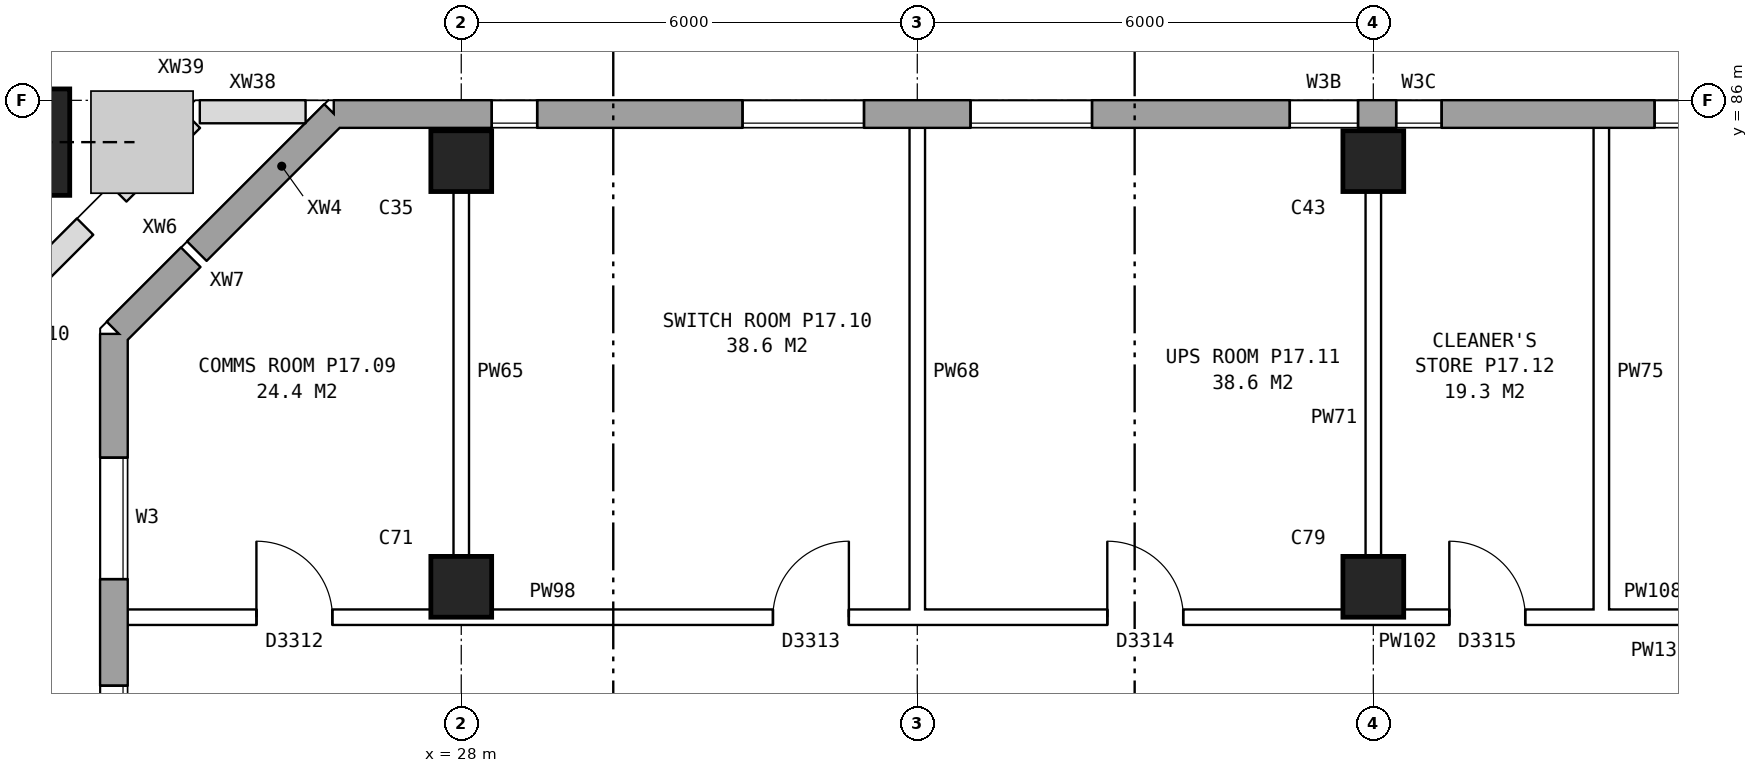
"""IFC4 building model, lengths in metres.
Left out: names, types, materials, properties, quantities, classifications, styles, units other than length and angle.
Written with IfcOpenShell. Run it as: python <this file> out.ifc"""

import sys

from ifc_helpers import new_model, si_unit, direction, frame, frame_2d, origin, origin_2d, place, context, subcontext, project, spatial, rectangle, hollow_rectangle, extrude, element, fill, save


model = new_model("IFC4")
c1 = context("Model", 3, precision=1e-05, world=origin(), true_north=direction((0.0, 1.0)))
c2 = subcontext(c1, "Body", "Model", "MODEL_VIEW")
j1 = project(units=[si_unit("LENGTHUNIT", "METRE"), si_unit("PLANEANGLEUNIT", "RADIAN")], contexts=[c1])
p1 = place(None, origin())
s1 = spatial("IfcSite", under=j1, at=p1, CompositionType="ELEMENT")
p2 = place(p1, origin())
s2 = spatial("IfcBuilding", under=s1, at=p2, CompositionType="ELEMENT")
p3 = place(p2, frame((0.0, 0.0, 62.9)))
s3 = spatial("IfcBuildingStorey", under=s2, at=p3, CompositionType="ELEMENT", Elevation=62.9)
for number, where, z_axis, x_axis in (
    (1, (28.0, 79.6, 0.0), (0.0, 0.0, 1.0), (1.0, 0.0, 0.0)),
    (2, (28.0, 85.2, 0.0), (0.0, 0.0, 1.0), (1.0, 0.0, 0.0)),
    (3, (40.0, 79.6, 0.0), (0.0, 0.0, 1.0), (1.0, 0.0, 0.0)),
    (4, (40.0, 85.2, 0.0), (0.0, 0.0, 1.0), (1.0, 0.0, 0.0)),
):
    element("IfcColumn", number, at=place(p3, frame(where, z_axis=z_axis, x_axis=x_axis)), inside=s3, PredefinedType="COLUMN", context=c2, shape_type="SweptSolid", body=[
        extrude(rectangle(XDim=0.8, YDim=0.8, at=origin_2d()), origin(), (0.0, 0.0, 1.0), 4.2),
    ])
p4 = place(p3, frame((22.149, 85.45, 0.254), z_axis=(0.362471013714, 0.0, 0.931995045168), x_axis=(0.0, 1.0, 0.0)))
e5 = element("IfcColumn", 5, at=p4, inside=s3, PredefinedType="COLUMN", context=c2, shape_type="SweptSolid", body=[
    extrude(hollow_rectangle(XDim=1.4, YDim=1.4, WallThickness=0.075, at=origin_2d()), origin(), (0.0, 0.0, 1.0), 4.284),
])
p5 = place(p3, frame((72.925, 85.82, 0.0), z_axis=(0.0, 0.0, 1.0), x_axis=(-1.0, 0.0, 0.0)))
e6 = element("IfcWall", 6, at=p5, inside=s3, PredefinedType="STANDARD", context=c2, shape_type="SweptSolid", body=[
    extrude(rectangle(XDim=46.601, YDim=0.36, at=frame_2d((23.3, 0.0))), origin(), (0.0, 0.0, 1.0), 4.2),
])
p6 = place(p5, frame((1.15, 0.0, 1.5)))
e7 = element("IfcOpeningElement", 7, at=p6, cuts=e6, PredefinedType="OPENING", context=c2, shape_type="SweptSolid", body=[
    extrude(rectangle(XDim=1.2, YDim=1.2, at=frame_2d((0.6, 0.6))), frame((0.0, 0.19, 0.0), z_axis=(0.0, -1.0, 0.0), x_axis=(1.0, 0.0, 0.0)), (0.0, 0.0, 1.0), 0.38),
])
p7 = place(p5, frame((3.625, 0.0, 1.5)))
e8 = element("IfcOpeningElement", 8, at=p7, cuts=e6, PredefinedType="OPENING", context=c2, shape_type="SweptSolid", body=[
    extrude(rectangle(XDim=1.6, YDim=1.2, at=frame_2d((0.8, 0.6))), frame((0.0, 0.19, 0.0), z_axis=(0.0, -1.0, 0.0), x_axis=(1.0, 0.0, 0.0)), (0.0, 0.0, 1.0), 0.38),
])
p8 = place(p5, frame((9.125, 0.0, 1.5)))
e9 = element("IfcOpeningElement", 9, at=p8, cuts=e6, PredefinedType="OPENING", context=c2, shape_type="SweptSolid", body=[
    extrude(rectangle(XDim=1.2, YDim=1.2, at=frame_2d((0.6, 0.6))), frame((0.0, 0.19, 0.0), z_axis=(0.0, -1.0, 0.0), x_axis=(1.0, 0.0, 0.0)), (0.0, 0.0, 1.0), 0.38),
])
p9 = place(p5, frame((12.625, 0.0, 1.5)))
e10 = element("IfcOpeningElement", 10, at=p9, cuts=e6, PredefinedType="OPENING", context=c2, shape_type="SweptSolid", body=[
    extrude(rectangle(XDim=1.6, YDim=1.2, at=frame_2d((0.8, 0.6))), frame((0.0, 0.19, 0.0), z_axis=(0.0, -1.0, 0.0), x_axis=(1.0, 0.0, 0.0)), (0.0, 0.0, 1.0), 0.38),
])
p10 = place(p5, frame((15.625, 0.0, 1.5)))
e11 = element("IfcOpeningElement", 11, at=p10, cuts=e6, PredefinedType="OPENING", context=c2, shape_type="SweptSolid", body=[
    extrude(rectangle(XDim=1.6, YDim=1.2, at=frame_2d((0.8, 0.6))), frame((0.0, 0.19, 0.0), z_axis=(0.0, -1.0, 0.0), x_axis=(1.0, 0.0, 0.0)), (0.0, 0.0, 1.0), 0.38),
])
p11 = place(p5, frame((20.175, 0.0, 1.5)))
e12 = element("IfcOpeningElement", 12, at=p11, cuts=e6, PredefinedType="OPENING", context=c2, shape_type="SweptSolid", body=[
    extrude(rectangle(XDim=1.6, YDim=1.2, at=frame_2d((0.8, 0.6))), frame((0.0, 0.19, 0.0), z_axis=(0.0, -1.0, 0.0), x_axis=(1.0, 0.0, 0.0)), (0.0, 0.0, 1.0), 0.38),
])
p12 = place(p5, frame((24.625, 0.0, 1.5)))
e13 = element("IfcOpeningElement", 13, at=p12, cuts=e6, PredefinedType="OPENING", context=c2, shape_type="SweptSolid", body=[
    extrude(rectangle(XDim=1.6, YDim=1.2, at=frame_2d((0.8, 0.6))), frame((0.0, 0.19, 0.0), z_axis=(0.0, -1.0, 0.0), x_axis=(1.0, 0.0, 0.0)), (0.0, 0.0, 1.0), 0.38),
])
p13 = place(p5, frame((27.625, 0.0, 1.5)))
e14 = element("IfcOpeningElement", 14, at=p13, cuts=e6, PredefinedType="OPENING", context=c2, shape_type="SweptSolid", body=[
    extrude(rectangle(XDim=1.6, YDim=1.2, at=frame_2d((0.8, 0.6))), frame((0.0, 0.19, 0.0), z_axis=(0.0, -1.0, 0.0), x_axis=(1.0, 0.0, 0.0)), (0.0, 0.0, 1.0), 0.38),
])
p14 = place(p5, frame((32.025, 0.0, 1.5)))
e15 = element("IfcOpeningElement", 15, at=p14, cuts=e6, PredefinedType="OPENING", context=c2, shape_type="SweptSolid", body=[
    extrude(rectangle(XDim=0.6, YDim=1.2, at=frame_2d((0.3, 0.6))), frame((0.0, 0.19, 0.0), z_axis=(0.0, -1.0, 0.0), x_axis=(1.0, 0.0, 0.0)), (0.0, 0.0, 1.0), 0.38),
])
p15 = place(p5, frame((33.125, 0.0, 1.5)))
e16 = element("IfcOpeningElement", 16, at=p15, cuts=e6, PredefinedType="OPENING", context=c2, shape_type="SweptSolid", body=[
    extrude(rectangle(XDim=0.9, YDim=1.2, at=frame_2d((0.45, 0.6))), frame((0.0, 0.19, 0.0), z_axis=(0.0, -1.0, 0.0), x_axis=(1.0, 0.0, 0.0)), (0.0, 0.0, 1.0), 0.38),
])
p16 = place(p5, frame((36.625, 0.0, 1.5)))
e17 = element("IfcOpeningElement", 17, at=p16, cuts=e6, PredefinedType="OPENING", context=c2, shape_type="SweptSolid", body=[
    extrude(rectangle(XDim=1.6, YDim=1.2, at=frame_2d((0.8, 0.6))), frame((0.0, 0.19, 0.0), z_axis=(0.0, -1.0, 0.0), x_axis=(1.0, 0.0, 0.0)), (0.0, 0.0, 1.0), 0.38),
])
p17 = place(p5, frame((39.625, 0.0, 1.5)))
e18 = element("IfcOpeningElement", 18, at=p17, cuts=e6, PredefinedType="OPENING", context=c2, shape_type="SweptSolid", body=[
    extrude(rectangle(XDim=1.6, YDim=1.2, at=frame_2d((0.8, 0.6))), frame((0.0, 0.19, 0.0), z_axis=(0.0, -1.0, 0.0), x_axis=(1.0, 0.0, 0.0)), (0.0, 0.0, 1.0), 0.38),
])
p18 = place(p5, frame((43.925, 0.0, 1.5)))
e19 = element("IfcOpeningElement", 19, at=p18, cuts=e6, PredefinedType="OPENING", context=c2, shape_type="SweptSolid", body=[
    extrude(rectangle(XDim=0.6, YDim=1.2, at=frame_2d((0.3, 0.6))), frame((0.0, 0.19, 0.0), z_axis=(0.0, -1.0, 0.0), x_axis=(1.0, 0.0, 0.0)), (0.0, 0.0, 1.0), 0.38),
])
p19 = place(p3, frame((26.325, 85.82, 0.0), z_axis=(0.0, 0.0, 1.0), x_axis=(-0.707169637916, -0.707043918869, 0.0)))
e20 = element("IfcWall", 20, at=p19, inside=s3, PredefinedType="STANDARD", context=c2, shape_type="SweptSolid", body=[
    extrude(rectangle(XDim=1.942, YDim=0.36, at=frame_2d((0.971, 0.0))), origin(), (0.0, 0.0, 1.0), 4.2),
])
p20 = place(p3, frame((24.951, 84.447, 0.0), z_axis=(0.0, 0.0, 1.0), x_axis=(-0.70690569865, -0.707307806556, 0.0)))
e21 = element("IfcWall", 21, at=p20, inside=s3, PredefinedType="STANDARD", context=c2, shape_type="SweptSolid", body=[
    extrude(rectangle(XDim=0.607, YDim=0.36, at=frame_2d((0.304, 0.0))), origin(), (0.0, 0.0, 1.0), 3.397),
])
p21 = place(p3, frame((24.439, 83.935, 0.953), z_axis=(0.0, 0.0, 1.0), x_axis=(-0.706911258792, -0.707302249532, 0.0)))
e22 = element("IfcWall", 22, at=p21, inside=s3, PredefinedType="STANDARD", context=c2, shape_type="SweptSolid", body=[
    extrude(rectangle(XDim=0.625, YDim=0.36, at=frame_2d((0.312, 0.0))), origin(), (0.0, 0.0, 1.0), 3.247),
])
p22 = place(p3, frame((23.998, 83.493, 0.0), z_axis=(0.0, 0.0, 1.0), x_axis=(-0.707106781187, -0.707106781187, 0.0)))
e23 = element("IfcWall", 23, at=p22, inside=s3, PredefinedType="STANDARD", context=c2, shape_type="SweptSolid", body=[
    extrude(rectangle(XDim=0.753, YDim=0.36, at=frame_2d((0.376, 0.0))), origin(), (0.0, 0.0, 1.0), 4.2),
])
p23 = place(p3, frame((23.43, 82.925, 0.0), z_axis=(0.0, 0.0, 1.0), x_axis=(0.0, -1.0, 0.0)))
e24 = element("IfcWall", 24, at=p23, inside=s3, PredefinedType="STANDARD", context=c2, shape_type="SweptSolid", body=[
    extrude(rectangle(XDim=25.851, YDim=0.36, at=frame_2d((12.925, 0.0))), origin(), (0.0, 0.0, 1.0), 4.2),
])
p24 = place(p23, frame((1.625, 0.0, 1.5)))
e25 = element("IfcOpeningElement", 25, at=p24, cuts=e24, PredefinedType="OPENING", context=c2, shape_type="SweptSolid", body=[
    extrude(rectangle(XDim=1.6, YDim=1.2, at=frame_2d((0.8, 0.6))), frame((0.0, 0.19, 0.0), z_axis=(0.0, -1.0, 0.0), x_axis=(1.0, 0.0, 0.0)), (0.0, 0.0, 1.0), 0.38),
])
p25 = place(p23, frame((4.625, 0.0, 1.5)))
e26 = element("IfcOpeningElement", 26, at=p25, cuts=e24, PredefinedType="OPENING", context=c2, shape_type="SweptSolid", body=[
    extrude(rectangle(XDim=1.6, YDim=1.2, at=frame_2d((0.8, 0.6))), frame((0.0, 0.19, 0.0), z_axis=(0.0, -1.0, 0.0), x_axis=(1.0, 0.0, 0.0)), (0.0, 0.0, 1.0), 0.38),
])
p26 = place(p23, frame((8.775, 0.0, 1.5)))
e27 = element("IfcOpeningElement", 27, at=p26, cuts=e24, PredefinedType="OPENING", context=c2, shape_type="SweptSolid", body=[
    extrude(rectangle(XDim=0.6, YDim=1.2, at=frame_2d((0.3, 0.6))), frame((0.0, 0.19, 0.0), z_axis=(0.0, -1.0, 0.0), x_axis=(1.0, 0.0, 0.0)), (0.0, 0.0, 1.0), 0.38),
])
p27 = place(p23, frame((9.675, 0.0, 1.5)))
e28 = element("IfcOpeningElement", 28, at=p27, cuts=e24, PredefinedType="OPENING", context=c2, shape_type="SweptSolid", body=[
    extrude(rectangle(XDim=1.2, YDim=1.2, at=frame_2d((0.6, 0.6))), frame((0.0, 0.19, 0.0), z_axis=(0.0, -1.0, 0.0), x_axis=(1.0, 0.0, 0.0)), (0.0, 0.0, 1.0), 0.38),
])
p28 = place(p23, frame((13.625, 0.0, 1.5)))
e29 = element("IfcOpeningElement", 29, at=p28, cuts=e24, PredefinedType="OPENING", context=c2, shape_type="SweptSolid", body=[
    extrude(rectangle(XDim=1.6, YDim=1.2, at=frame_2d((0.8, 0.6))), frame((0.0, 0.19, 0.0), z_axis=(0.0, -1.0, 0.0), x_axis=(1.0, 0.0, 0.0)), (0.0, 0.0, 1.0), 0.38),
])
p29 = place(p23, frame((16.625, 0.0, 1.5)))
e30 = element("IfcOpeningElement", 30, at=p29, cuts=e24, PredefinedType="OPENING", context=c2, shape_type="SweptSolid", body=[
    extrude(rectangle(XDim=1.6, YDim=1.2, at=frame_2d((0.8, 0.6))), frame((0.0, 0.19, 0.0), z_axis=(0.0, -1.0, 0.0), x_axis=(1.0, 0.0, 0.0)), (0.0, 0.0, 1.0), 0.38),
])
p30 = place(p23, frame((21.125, 0.0, 1.5)))
e31 = element("IfcOpeningElement", 31, at=p30, cuts=e24, PredefinedType="OPENING", context=c2, shape_type="SweptSolid", body=[
    extrude(rectangle(XDim=0.6, YDim=1.2, at=frame_2d((0.3, 0.6))), frame((0.0, 0.19, 0.0), z_axis=(0.0, -1.0, 0.0), x_axis=(1.0, 0.0, 0.0)), (0.0, 0.0, 1.0), 0.38),
])
p31 = place(p23, frame((22.325, 0.0, 1.5)))
e32 = element("IfcOpeningElement", 32, at=p31, cuts=e24, PredefinedType="OPENING", context=c2, shape_type="SweptSolid", body=[
    extrude(rectangle(XDim=0.9, YDim=1.2, at=frame_2d((0.45, 0.6))), frame((0.0, 0.19, 0.0), z_axis=(0.0, -1.0, 0.0), x_axis=(1.0, 0.0, 0.0)), (0.0, 0.0, 1.0), 0.38),
])
p32 = place(p23, frame((15.525, 0.0, 1.5)))
e33 = element("IfcOpeningElement", 33, at=p32, cuts=e24, PredefinedType="OPENING", context=c2, shape_type="SweptSolid", body=[
    extrude(rectangle(XDim=0.6, YDim=1.2, at=frame_2d((0.3, 0.6))), frame((0.0, 0.19, 0.0), z_axis=(0.0, -1.0, 0.0), x_axis=(1.0, 0.0, 0.0)), (0.0, 0.0, 1.0), 0.38),
])
p33 = place(p3, frame((25.95, 85.85, 0.0), z_axis=(0.0, 0.0, 1.0), x_axis=(-1.0, 0.0, 0.0)))
e34 = element("IfcWall", 34, at=p33, inside=s3, PredefinedType="PARAPET", context=c2, shape_type="SweptSolid", body=[
    extrude(rectangle(XDim=1.388, YDim=0.3, at=frame_2d((0.694, 0.0))), origin(), (0.0, 0.0, 1.0), 1.1),
])
p34 = place(p3, frame((24.455, 85.742, 0.0), z_axis=(0.0, 0.0, 1.0), x_axis=(-0.707106781187, -0.707106781187, 0.0)))
e35 = element("IfcWall", 35, at=p34, inside=s3, PredefinedType="PARAPET", context=c2, shape_type="SweptSolid", body=[
    extrude(rectangle(XDim=1.365, YDim=0.3, at=frame_2d((0.683, 0.0))), origin(), (0.0, 0.0, 1.0), 1.1),
])
p35 = place(p3, frame((23.05, 84.337, 0.0), z_axis=(0.0, 0.0, 1.0), x_axis=(-0.70716845375, -0.707045103244, 0.0)))
e36 = element("IfcWall", 36, at=p35, inside=s3, PredefinedType="PARAPET", context=c2, shape_type="SweptSolid", body=[
    extrude(rectangle(XDim=1.979, YDim=0.3, at=frame_2d((0.99, 0.0))), origin(), (0.0, 0.0, 1.0), 1.1),
])
p36 = place(p3, frame((23.49, 79.2, 0.0), z_axis=(0.0, 0.0, 1.0), x_axis=(1.0, 0.0, 0.0)))
e37 = element("IfcWall", 37, at=p36, inside=s3, PredefinedType="PARTITIONING", context=c2, shape_type="SweptSolid", body=[
    extrude(rectangle(XDim=16.61, YDim=0.2, at=frame_2d((8.305, 0.0))), origin(), (0.0, 0.0, 1.0), 4.2),
])
p37 = place(p36, frame((1.815, 0.0, 0.0)))
e38 = element("IfcOpeningElement", 38, at=p37, cuts=e37, PredefinedType="OPENING", context=c2, shape_type="SweptSolid", body=[
    extrude(rectangle(XDim=1.0, YDim=2.1, at=frame_2d((0.5, 1.05))), frame((0.0, 0.11, 0.0), z_axis=(0.0, -1.0, 0.0), x_axis=(1.0, 0.0, 0.0)), (0.0, 0.0, 1.0), 0.22),
])
p38 = place(p36, frame((8.61, 0.0, 0.0)))
e39 = element("IfcOpeningElement", 39, at=p38, cuts=e37, PredefinedType="OPENING", context=c2, shape_type="SweptSolid", body=[
    extrude(rectangle(XDim=1.0, YDim=2.1, at=frame_2d((0.5, 1.05))), frame((0.0, 0.11, 0.0), z_axis=(0.0, -1.0, 0.0), x_axis=(1.0, 0.0, 0.0)), (0.0, 0.0, 1.0), 0.22),
])
p39 = place(p36, frame((13.01, 0.0, 0.0)))
e40 = element("IfcOpeningElement", 40, at=p39, cuts=e37, PredefinedType="OPENING", context=c2, shape_type="SweptSolid", body=[
    extrude(rectangle(XDim=1.0, YDim=2.1, at=frame_2d((0.5, 1.05))), frame((0.0, 0.11, 0.0), z_axis=(0.0, -1.0, 0.0), x_axis=(1.0, 0.0, 0.0)), (0.0, 0.0, 1.0), 0.22),
])
p40 = place(p3, frame((42.9, 79.2, 0.0), z_axis=(0.0, 0.0, 1.0), x_axis=(1.0, 0.0, 0.0)))
e41 = element("IfcWall", 41, at=p40, inside=s3, PredefinedType="PARTITIONING", context=c2, shape_type="SweptSolid", body=[
    extrude(rectangle(XDim=1.56, YDim=0.2, at=frame_2d((0.78, 0.0))), origin(), (0.0, 0.0, 1.0), 4.2),
])
p41 = place(p3, frame((39.9, 79.2, 0.0), z_axis=(0.0, 0.0, 1.0), x_axis=(1.0, 0.0, 0.0)))
e42 = element("IfcWall", 42, at=p41, inside=s3, PredefinedType="PARTITIONING", context=c2, shape_type="SweptSolid", body=[
    extrude(rectangle(XDim=3.2, YDim=0.2, at=frame_2d((1.6, 0.0))), origin(), (0.0, 0.0, 1.0), 4.2),
])
p42 = place(p41, frame((1.1, 0.0, 0.0)))
e43 = element("IfcOpeningElement", 43, at=p42, cuts=e42, PredefinedType="OPENING", context=c2, shape_type="SweptSolid", body=[
    extrude(rectangle(XDim=1.0, YDim=2.1, at=frame_2d((0.5, 1.05))), frame((0.0, 0.11, 0.0), z_axis=(0.0, -1.0, 0.0), x_axis=(1.0, 0.0, 0.0)), (0.0, 0.0, 1.0), 0.22),
])
for number, where, z_axis, x_axis in (
    (44, (28.0, 79.1, 0.0), (0.0, 0.0, 1.0), (0.0, 1.0, 0.0)),
    (45, (34.0, 79.1, 0.0), (0.0, 0.0, 1.0), (0.0, 1.0, 0.0)),
    (46, (40.0, 79.1, 0.0), (0.0, 0.0, 1.0), (0.0, 1.0, 0.0)),
    (47, (43.0, 79.1, 0.0), (0.0, 0.0, 1.0), (0.0, 1.0, 0.0)),
):
    element("IfcWall", number, at=place(p3, frame(where, z_axis=z_axis, x_axis=x_axis)), inside=s3, PredefinedType="PARTITIONING", context=c2, shape_type="SweptSolid", body=[
        extrude(rectangle(XDim=6.66, YDim=0.2, at=frame_2d((3.33, 0.0))), origin(), (0.0, 0.0, 1.0), 4.2),
    ])
p43 = place(p13, origin())
e48 = element("IfcWindow", 48, at=p43, inside=s3, PartitioningType="DOUBLE_PANEL_HORIZONTAL", PredefinedType="WINDOW", context=c2, shape_type="SweptSolid", body=[
    extrude(rectangle(XDim=1.6, YDim=1.2, at=frame_2d((0.8, 0.6))), frame((0.0, 0.15, 0.0), z_axis=(0.0, -1.0, 0.0), x_axis=(1.0, 0.0, 0.0)), (0.0, 0.0, 1.0), 0.06),
])
fill(e14, e48)
p44 = place(p14, origin())
e49 = element("IfcWindow", 49, at=p44, inside=s3, PartitioningType="DOUBLE_PANEL_HORIZONTAL", PredefinedType="WINDOW", context=c2, shape_type="SweptSolid", body=[
    extrude(rectangle(XDim=0.6, YDim=1.2, at=frame_2d((0.3, 0.6))), frame((0.0, 0.15, 0.0), z_axis=(0.0, -1.0, 0.0), x_axis=(1.0, 0.0, 0.0)), (0.0, 0.0, 1.0), 0.06),
])
fill(e15, e49)
p45 = place(p15, origin())
e50 = element("IfcWindow", 50, at=p45, inside=s3, PartitioningType="DOUBLE_PANEL_HORIZONTAL", PredefinedType="WINDOW", context=c2, shape_type="SweptSolid", body=[
    extrude(rectangle(XDim=0.9, YDim=1.2, at=frame_2d((0.45, 0.6))), frame((0.0, 0.15, 0.0), z_axis=(0.0, -1.0, 0.0), x_axis=(1.0, 0.0, 0.0)), (0.0, 0.0, 1.0), 0.06),
])
fill(e16, e50)
p46 = place(p16, origin())
e51 = element("IfcWindow", 51, at=p46, inside=s3, PartitioningType="DOUBLE_PANEL_HORIZONTAL", PredefinedType="WINDOW", context=c2, shape_type="SweptSolid", body=[
    extrude(rectangle(XDim=1.6, YDim=1.2, at=frame_2d((0.8, 0.6))), frame((0.0, 0.15, 0.0), z_axis=(0.0, -1.0, 0.0), x_axis=(1.0, 0.0, 0.0)), (0.0, 0.0, 1.0), 0.06),
])
fill(e17, e51)
p47 = place(p17, origin())
e52 = element("IfcWindow", 52, at=p47, inside=s3, PartitioningType="DOUBLE_PANEL_HORIZONTAL", PredefinedType="WINDOW", context=c2, shape_type="SweptSolid", body=[
    extrude(rectangle(XDim=1.6, YDim=1.2, at=frame_2d((0.8, 0.6))), frame((0.0, 0.15, 0.0), z_axis=(0.0, -1.0, 0.0), x_axis=(1.0, 0.0, 0.0)), (0.0, 0.0, 1.0), 0.06),
])
fill(e18, e52)
p48 = place(p18, origin())
e53 = element("IfcWindow", 53, at=p48, inside=s3, PartitioningType="DOUBLE_PANEL_HORIZONTAL", PredefinedType="WINDOW", context=c2, shape_type="SweptSolid", body=[
    extrude(rectangle(XDim=0.6, YDim=1.2, at=frame_2d((0.3, 0.6))), frame((0.0, 0.15, 0.0), z_axis=(0.0, -1.0, 0.0), x_axis=(1.0, 0.0, 0.0)), (0.0, 0.0, 1.0), 0.06),
])
fill(e19, e53)
p49 = place(p24, origin())
e54 = element("IfcWindow", 54, at=p49, inside=s3, PartitioningType="DOUBLE_PANEL_HORIZONTAL", PredefinedType="WINDOW", context=c2, shape_type="SweptSolid", body=[
    extrude(rectangle(XDim=1.6, YDim=1.2, at=frame_2d((0.8, 0.6))), frame((0.0, 0.15, 0.0), z_axis=(0.0, -1.0, 0.0), x_axis=(1.0, 0.0, 0.0)), (0.0, 0.0, 1.0), 0.06),
])
fill(e25, e54)
p50 = place(p25, origin())
e55 = element("IfcWindow", 55, at=p50, inside=s3, PartitioningType="DOUBLE_PANEL_HORIZONTAL", PredefinedType="WINDOW", context=c2, shape_type="SweptSolid", body=[
    extrude(rectangle(XDim=1.6, YDim=1.2, at=frame_2d((0.8, 0.6))), frame((0.0, 0.15, 0.0), z_axis=(0.0, -1.0, 0.0), x_axis=(1.0, 0.0, 0.0)), (0.0, 0.0, 1.0), 0.06),
])
fill(e26, e55)
p51 = place(p37, origin())
e56 = element("IfcDoor", 56, at=p51, inside=s3, OperationType="SINGLE_SWING_LEFT", PredefinedType="DOOR", context=c2, shape_type="SweptSolid", body=[
    extrude(rectangle(XDim=1.0, YDim=2.1, at=frame_2d((0.5, 1.05))), frame((0.0, 0.025, 0.0), z_axis=(0.0, -1.0, 0.0), x_axis=(1.0, 0.0, 0.0)), (0.0, 0.0, 1.0), 0.05),
])
fill(e38, e56)
p52 = place(p38, origin())
e57 = element("IfcDoor", 57, at=p52, inside=s3, OperationType="SINGLE_SWING_RIGHT", PredefinedType="DOOR", context=c2, shape_type="SweptSolid", body=[
    extrude(rectangle(XDim=1.0, YDim=2.1, at=frame_2d((0.5, 1.05))), frame((0.0, 0.025, 0.0), z_axis=(0.0, -1.0, 0.0), x_axis=(1.0, 0.0, 0.0)), (0.0, 0.0, 1.0), 0.05),
])
fill(e39, e57)
p53 = place(p39, origin())
e58 = element("IfcDoor", 58, at=p53, inside=s3, OperationType="SINGLE_SWING_LEFT", PredefinedType="DOOR", context=c2, shape_type="SweptSolid", body=[
    extrude(rectangle(XDim=1.0, YDim=2.1, at=frame_2d((0.5, 1.05))), frame((0.0, 0.025, 0.0), z_axis=(0.0, -1.0, 0.0), x_axis=(1.0, 0.0, 0.0)), (0.0, 0.0, 1.0), 0.05),
])
fill(e40, e58)
p54 = place(p42, origin())
e59 = element("IfcDoor", 59, at=p54, inside=s3, OperationType="SINGLE_SWING_LEFT", PredefinedType="DOOR", context=c2, shape_type="SweptSolid", body=[
    extrude(rectangle(XDim=1.0, YDim=2.1, at=frame_2d((0.5, 1.05))), frame((0.0, 0.025, 0.0), z_axis=(0.0, -1.0, 0.0), x_axis=(1.0, 0.0, 0.0)), (0.0, 0.0, 1.0), 0.05),
])
fill(e43, e59)
save(model, sys.argv[1])
